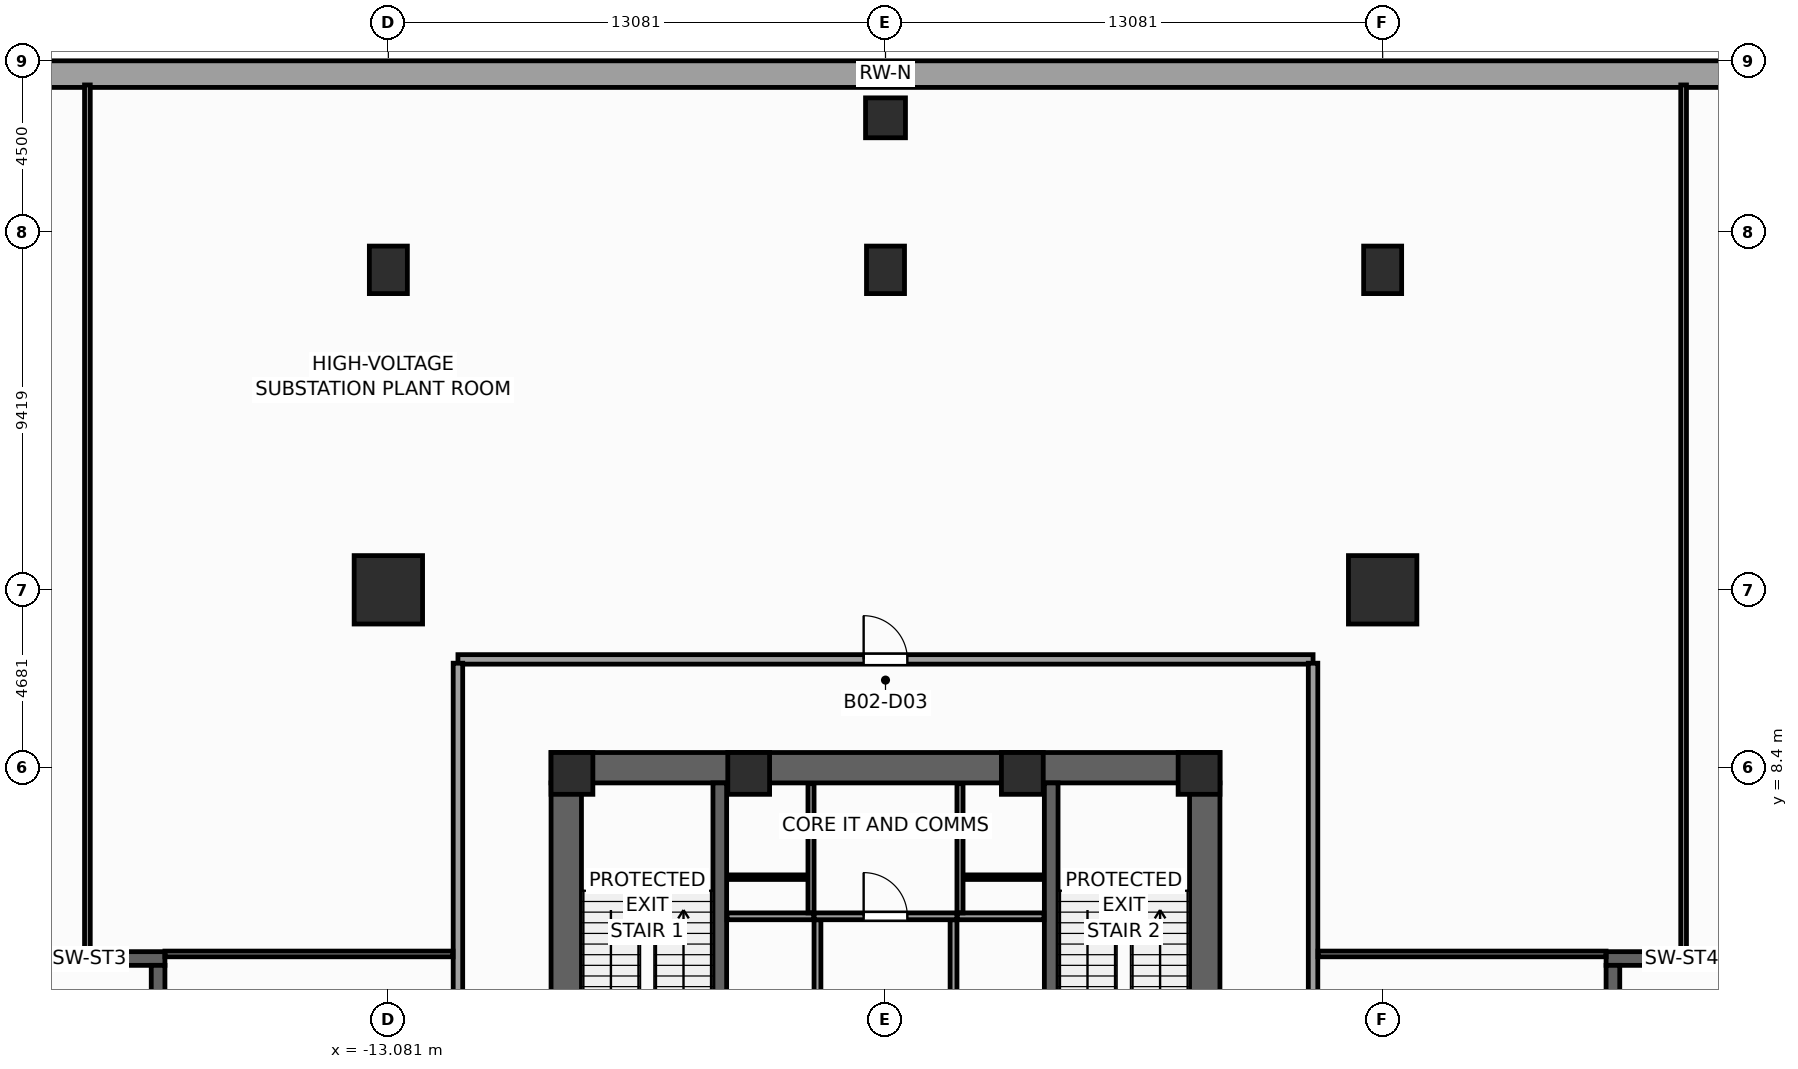
"""IFC4 building model, lengths in metres.
Left out: names, types, materials, properties, quantities, classifications, styles, units other than length and angle.
Written with IfcOpenShell. Run it as: python <this file> out.ifc"""

import sys

from ifc_helpers import new_model, si_unit, direction, frame, frame_2d, origin, origin_2d, place, context, subcontext, project, spatial, rectangle, extrude, source, transform, mapped, element, fill, save


model = new_model("IFC4")
c1 = context("Model", 3, precision=1e-05, world=origin(), true_north=direction((0.0, 1.0)))
c2 = subcontext(c1, "Body", "Model", "MODEL_VIEW")
j1 = project(units=[si_unit("LENGTHUNIT", "METRE"), si_unit("PLANEANGLEUNIT", "RADIAN")], contexts=[c1])
p1 = place(None, origin())
s1 = spatial("IfcSite", under=j1, at=p1, CompositionType="ELEMENT")
p2 = place(p1, origin())
s2 = spatial("IfcBuilding", under=s1, at=p2, CompositionType="ELEMENT")
p3 = place(p2, frame((0.0, 0.0, -9.0)))
s3 = spatial("IfcBuildingStorey", under=s2, at=p3, CompositionType="ELEMENT", Elevation=-9.0)
p4 = place(p3, frame((-8.8, 8.4, 0.0), z_axis=(0.0, 0.0, 1.0), x_axis=(1.0, 0.0, 0.0)))
e1 = element("IfcWall", 1, at=p4, inside=s3, PredefinedType="SHEAR", context=c2, shape_type="SweptSolid", body=[
    extrude(rectangle(XDim=17.6, YDim=0.8, at=frame_2d((8.8, 0.0))), origin(), (0.0, 0.0, 1.0), 4.5),
])
p5 = place(p3, frame((-8.4, -8.0, 0.0), z_axis=(0.0, 0.0, 1.0), x_axis=(0.0, 1.0, 0.0)))
e2 = element("IfcWall", 2, at=p5, inside=s3, PredefinedType="SHEAR", context=c2, shape_type="SweptSolid", body=[
    extrude(rectangle(XDim=16.0, YDim=0.8, at=frame_2d((8.0, 0.0))), origin(), (0.0, 0.0, 1.0), 4.5),
])
p6 = place(p5, frame((4.69, 0.0, 0.0)))
e3 = element("IfcOpeningElement", 3, at=p6, cuts=e2, PredefinedType="OPENING", context=c2, shape_type="SweptSolid", body=[
    extrude(rectangle(XDim=1.3, YDim=2.2, at=frame_2d((0.65, 1.1))), frame((0.0, 0.41, 0.0), z_axis=(0.0, -1.0, 0.0), x_axis=(1.0, 0.0, 0.0)), (0.0, 0.0, 1.0), 0.82),
])
p7 = place(p3, frame((8.4, -8.0, 0.0), z_axis=(0.0, 0.0, 1.0), x_axis=(0.0, 1.0, 0.0)))
e4 = element("IfcWall", 4, at=p7, inside=s3, PredefinedType="SHEAR", context=c2, shape_type="SweptSolid", body=[
    extrude(rectangle(XDim=16.0, YDim=0.8, at=frame_2d((8.0, 0.0))), origin(), (0.0, 0.0, 1.0), 4.5),
])
p8 = place(p7, frame((4.69, 0.0, 0.0)))
e5 = element("IfcOpeningElement", 5, at=p8, cuts=e4, PredefinedType="OPENING", context=c2, shape_type="SweptSolid", body=[
    extrude(rectangle(XDim=1.3, YDim=2.2, at=frame_2d((0.65, 1.1))), frame((0.0, 0.41, 0.0), z_axis=(0.0, -1.0, 0.0), x_axis=(1.0, 0.0, 0.0)), (0.0, 0.0, 1.0), 0.82),
])
for number, where, z_axis, x_axis in (
    (6, (-4.36, -8.0, 0.0), (0.0, 0.0, 1.0), (0.0, 1.0, 0.0)),
    (7, (4.36, -8.0, 0.0), (0.0, 0.0, 1.0), (0.0, 1.0, 0.0)),
):
    element("IfcWall", number, at=place(p3, frame(where, z_axis=z_axis, x_axis=x_axis)), inside=s3, PredefinedType="SHEAR", context=c2, shape_type="SweptSolid", body=[
        extrude(rectangle(XDim=16.0, YDim=0.36, at=frame_2d((8.0, 0.0))), origin(), (0.0, 0.0, 1.0), 4.5),
    ])
p9 = place(p3, frame((-22.94, 3.38, 0.0), z_axis=(0.0, 0.0, 1.0), x_axis=(1.0, 0.0, 0.0)))
e8 = element("IfcWall", 8, at=p9, inside=s3, PredefinedType="SHEAR", context=c2, shape_type="SweptSolid", body=[
    extrude(rectangle(XDim=3.98, YDim=0.36, at=frame_2d((1.99, 0.0))), origin(), (0.0, 0.0, 1.0), 4.5),
])
p10 = place(p3, frame((-19.14, -4.6, 0.0), z_axis=(0.0, 0.0, 1.0), x_axis=(0.0, 1.0, 0.0)))
e9 = element("IfcWall", 9, at=p10, inside=s3, PredefinedType="SHEAR", context=c2, shape_type="SweptSolid", body=[
    extrude(rectangle(XDim=7.8, YDim=0.36, at=frame_2d((3.9, 0.0))), origin(), (0.0, 0.0, 1.0), 4.5),
])
p11 = place(p3, frame((18.96, 3.38, 0.0), z_axis=(0.0, 0.0, 1.0), x_axis=(1.0, 0.0, 0.0)))
e10 = element("IfcWall", 10, at=p11, inside=s3, PredefinedType="SHEAR", context=c2, shape_type="SweptSolid", body=[
    extrude(rectangle(XDim=3.98, YDim=0.36, at=frame_2d((1.99, 0.0))), origin(), (0.0, 0.0, 1.0), 4.5),
])
p12 = place(p3, frame((19.14, -4.6, 0.0), z_axis=(0.0, 0.0, 1.0), x_axis=(0.0, 1.0, 0.0)))
e11 = element("IfcWall", 11, at=p12, inside=s3, PredefinedType="SHEAR", context=c2, shape_type="SweptSolid", body=[
    extrude(rectangle(XDim=7.8, YDim=0.36, at=frame_2d((3.9, 0.0))), origin(), (0.0, 0.0, 1.0), 4.5),
])
p13 = place(p3, frame((-42.0, 26.65, 0.0), z_axis=(0.0, 0.0, 1.0), x_axis=(1.0, 0.0, 0.0)))
e12 = element("IfcWall", 12, at=p13, inside=s3, PredefinedType="USERDEFINED", context=c2, shape_type="SweptSolid", body=[
    extrude(rectangle(XDim=84.0, YDim=0.7, at=frame_2d((42.0, 0.0))), origin(), (0.0, 0.0, 1.0), 4.5),
])
m1 = source(origin(), c2, "Body", "SweptSolid", [
    extrude(rectangle(XDim=1.1, YDim=1.1, at=origin_2d()), origin(), (0.0, 0.0, 1.0), 4.5),
])
for number, where, z_axis, x_axis in (
    (13, (8.25, 8.25, 0.0), (0.0, 0.0, 1.0), (1.0, 0.0, 0.0)),
    (14, (-8.25, 8.25, 0.0), (0.0, 0.0, 1.0), (1.0, 0.0, 0.0)),
    (15, (-3.6, 8.25, 0.0), (0.0, 0.0, 1.0), (1.0, 0.0, 0.0)),
    (16, (3.6, 8.25, 0.0), (0.0, 0.0, 1.0), (1.0, 0.0, 0.0)),
):
    element("IfcColumn", number, at=place(p3, frame(where, z_axis=z_axis, x_axis=x_axis)), inside=s3, PredefinedType="PILASTER", context=c2, shape_type="MappedRepresentation", body=[
        mapped(m1, transform((0.0, 0.0, 0.0), scale=1.0)),
    ])
m2 = source(origin(), c2, "Body", "SweptSolid", [
    extrude(rectangle(XDim=1.8, YDim=1.8, at=origin_2d()), origin(), (0.0, 0.0, 1.0), 4.5),
])
for number, where, z_axis, x_axis in (
    (17, (13.081, 13.081, 0.0), (0.0, 0.0, 1.0), (1.0, 0.0, 0.0)),
    (18, (-13.081, 13.081, 0.0), (0.0, 0.0, 1.0), (1.0, 0.0, 0.0)),
):
    element("IfcColumn", number, at=place(p3, frame(where, z_axis=z_axis, x_axis=x_axis)), inside=s3, PredefinedType="COLUMN", context=c2, shape_type="MappedRepresentation", body=[
        mapped(m2, transform((0.0, 0.0, 0.0), scale=1.0)),
    ])
m3 = source(origin(), c2, "Body", "SweptSolid", [
    extrude(rectangle(XDim=1.0, YDim=1.25, at=origin_2d()), origin(), (0.0, 0.0, 1.0), 4.5),
])
for number, where, z_axis, x_axis in (
    (19, (-13.081, 21.5, 0.0), (0.0, 0.0, 1.0), (1.0, 0.0, 0.0)),
    (20, (0.0, 21.5, 0.0), (0.0, 0.0, 1.0), (1.0, 0.0, 0.0)),
    (21, (13.081, 21.5, 0.0), (0.0, 0.0, 1.0), (1.0, 0.0, 0.0)),
):
    element("IfcColumn", number, at=place(p3, frame(where, z_axis=z_axis, x_axis=x_axis)), inside=s3, PredefinedType="COLUMN", context=c2, shape_type="MappedRepresentation", body=[
        mapped(m3, transform((0.0, 0.0, 0.0), scale=1.0)),
    ])
m4 = source(origin(), c2, "Body", "SweptSolid", [
    extrude(rectangle(XDim=1.05, YDim=1.05, at=origin_2d()), origin(), (0.0, 0.0, 1.0), 4.5),
])
p14 = place(p3, frame((0.0, 25.5, 0.0), z_axis=(0.0, 0.0, 1.0), x_axis=(1.0, 0.0, 0.0)))
e22 = element("IfcColumn", 22, at=p14, inside=s3, PredefinedType="COLUMN", context=c2, shape_type="MappedRepresentation", body=[
    mapped(m4, transform((0.0, 0.0, 0.0), scale=1.0)),
])
for number, where, z_axis, x_axis in (
    (23, (-1.79, -7.98, 0.0), (0.0, 0.0, 1.0), (0.0, 1.0, 0.0)),
    (24, (1.79, -7.98, 0.0), (0.0, 0.0, 1.0), (0.0, 1.0, 0.0)),
):
    element("IfcWall", number, at=place(p3, frame(where, z_axis=z_axis, x_axis=x_axis)), inside=s3, PredefinedType="PARTITIONING", context=c2, shape_type="SweptSolid", body=[
        extrude(rectangle(XDim=12.38, YDim=0.18, at=frame_2d((6.19, 0.0))), origin(), (0.0, 0.0, 1.0), 4.18),
    ])
p15 = place(p3, frame((-1.88, 4.49, 0.0), z_axis=(0.0, 0.0, 1.0), x_axis=(1.0, 0.0, 0.0)))
e25 = element("IfcWall", 25, at=p15, inside=s3, PredefinedType="PARTITIONING", context=c2, shape_type="SweptSolid", body=[
    extrude(rectangle(XDim=3.76, YDim=0.18, at=frame_2d((1.88, 0.0))), origin(), (0.0, 0.0, 1.0), 4.18),
])
p16 = place(p15, frame((1.305, 0.0, 0.0)))
e26 = element("IfcOpeningElement", 26, at=p16, cuts=e25, PredefinedType="OPENING", context=c2, shape_type="SweptSolid", body=[
    extrude(rectangle(XDim=1.15, YDim=2.25, at=frame_2d((0.575, 1.125))), frame((0.0, 0.1, 0.0), z_axis=(0.0, -1.0, 0.0), x_axis=(1.0, 0.0, 0.0)), (0.0, 0.0, 1.0), 0.2),
])
for number, where, z_axis, x_axis in (
    (27, (-4.17, 4.49, 0.0), (0.0, 0.0, 1.0), (1.0, 0.0, 0.0)),
    (28, (1.89, 4.49, 0.0), (0.0, 0.0, 1.0), (1.0, 0.0, 0.0)),
):
    element("IfcWall", number, at=place(p3, frame(where, z_axis=z_axis, x_axis=x_axis)), inside=s3, PredefinedType="PARTITIONING", context=c2, shape_type="SweptSolid", body=[
        extrude(rectangle(XDim=2.28, YDim=0.18, at=frame_2d((1.14, 0.0))), origin(), (0.0, 0.0, 1.0), 4.18),
    ])
for number, where, z_axis, x_axis in (
    (29, (-1.96, 4.58, 0.0), (0.0, 0.0, 1.0), (0.0, 1.0, 0.0)),
    (30, (1.96, 4.58, 0.0), (0.0, 0.0, 1.0), (0.0, 1.0, 0.0)),
):
    element("IfcWall", number, at=place(p3, frame(where, z_axis=z_axis, x_axis=x_axis)), inside=s3, PredefinedType="PARTITIONING", context=c2, shape_type="SweptSolid", body=[
        extrude(rectangle(XDim=3.4, YDim=0.16, at=frame_2d((1.7, 0.0))), origin(), (0.0, 0.0, 1.0), 4.18),
    ])
for number, where, z_axis, x_axis in (
    (31, (-4.16, 5.52, 0.0), (0.0, 0.0, 1.0), (1.0, 0.0, 0.0)),
    (32, (2.06, 5.52, 0.0), (0.0, 0.0, 1.0), (1.0, 0.0, 0.0)),
):
    element("IfcWall", number, at=place(p3, frame(where, z_axis=z_axis, x_axis=x_axis)), inside=s3, PredefinedType="PARTITIONING", context=c2, shape_type="SweptSolid", body=[
        extrude(rectangle(XDim=2.1, YDim=0.12, at=frame_2d((1.05, 0.0))), origin(), (0.0, 0.0, 1.0), 4.18),
    ])
p17 = place(p3, frame((-11.25, 11.25, 0.0), z_axis=(0.0, 0.0, 1.0), x_axis=(1.0, 0.0, 0.0)))
e33 = element("IfcWall", 33, at=p17, inside=s3, PredefinedType="PARTITIONING", context=c2, shape_type="SweptSolid", body=[
    extrude(rectangle(XDim=22.5, YDim=0.25, at=frame_2d((11.25, 0.0))), origin(), (0.0, 0.0, 1.0), 4.18),
])
p18 = place(p17, frame((10.675, 0.0, 0.0)))
e34 = element("IfcOpeningElement", 34, at=p18, cuts=e33, PredefinedType="OPENING", context=c2, shape_type="SweptSolid", body=[
    extrude(rectangle(XDim=1.15, YDim=2.25, at=frame_2d((0.575, 1.125))), frame((0.0, 0.135, 0.0), z_axis=(0.0, -1.0, 0.0), x_axis=(1.0, 0.0, 0.0)), (0.0, 0.0, 1.0), 0.27),
])
p19 = place(p3, frame((-11.25, -4.96, 0.0), z_axis=(0.0, 0.0, 1.0), x_axis=(0.0, 1.0, 0.0)))
e35 = element("IfcWall", 35, at=p19, inside=s3, PredefinedType="PARTITIONING", context=c2, shape_type="SweptSolid", body=[
    extrude(rectangle(XDim=16.11, YDim=0.25, at=frame_2d((8.055, 0.0))), origin(), (0.0, 0.0, 1.0), 4.18),
])
p20 = place(p19, frame((3.82, 0.0, 0.0)))
e36 = element("IfcOpeningElement", 36, at=p20, cuts=e35, PredefinedType="OPENING", context=c2, shape_type="SweptSolid", body=[
    extrude(rectangle(XDim=1.15, YDim=2.25, at=frame_2d((0.575, 1.125))), frame((0.0, 0.135, 0.0), z_axis=(0.0, -1.0, 0.0), x_axis=(1.0, 0.0, 0.0)), (0.0, 0.0, 1.0), 0.27),
])
p21 = place(p3, frame((11.25, -4.96, 0.0), z_axis=(0.0, 0.0, 1.0), x_axis=(0.0, 1.0, 0.0)))
e37 = element("IfcWall", 37, at=p21, inside=s3, PredefinedType="PARTITIONING", context=c2, shape_type="SweptSolid", body=[
    extrude(rectangle(XDim=16.11, YDim=0.25, at=frame_2d((8.055, 0.0))), origin(), (0.0, 0.0, 1.0), 4.18),
])
p22 = place(p21, frame((3.82, 0.0, 0.0)))
e38 = element("IfcOpeningElement", 38, at=p22, cuts=e37, PredefinedType="OPENING", context=c2, shape_type="SweptSolid", body=[
    extrude(rectangle(XDim=1.15, YDim=2.25, at=frame_2d((0.575, 1.125))), frame((0.0, 0.135, 0.0), z_axis=(0.0, -1.0, 0.0), x_axis=(1.0, 0.0, 0.0)), (0.0, 0.0, 1.0), 0.27),
])
for number, where, z_axis, x_axis in (
    (39, (-21.0, 3.56, 0.0), (0.0, 0.0, 1.0), (0.0, 1.0, 0.0)),
    (40, (21.0, 3.56, 0.0), (0.0, 0.0, 1.0), (0.0, 1.0, 0.0)),
):
    element("IfcWall", number, at=place(p3, frame(where, z_axis=z_axis, x_axis=x_axis)), inside=s3, PredefinedType="PARTITIONING", context=c2, shape_type="SweptSolid", body=[
        extrude(rectangle(XDim=22.805, YDim=0.15, at=frame_2d((11.402, 0.0))), origin(), (0.0, 0.0, 1.0), 4.18),
    ])
for number, where, z_axis, x_axis in (
    (41, (-18.96, 3.5, 0.0), (0.0, 0.0, 1.0), (1.0, 0.0, 0.0)),
    (42, (11.38, 3.5, 0.0), (0.0, 0.0, 1.0), (1.0, 0.0, 0.0)),
):
    element("IfcWall", number, at=place(p3, frame(where, z_axis=z_axis, x_axis=x_axis)), inside=s3, PredefinedType="PARTITIONING", context=c2, shape_type="SweptSolid", body=[
        extrude(rectangle(XDim=7.58, YDim=0.15, at=frame_2d((3.79, 0.0))), origin(), (0.0, 0.0, 1.0), 4.18),
    ])
m5 = source(origin(), c2, "Body", "SweptSolid", [
    extrude(rectangle(XDim=1.15, YDim=2.25, at=frame_2d((0.575, 1.125))), frame((0.0, 0.025, 0.0), z_axis=(0.0, -1.0, 0.0), x_axis=(1.0, 0.0, 0.0)), (0.0, 0.0, 1.0), 0.05),
])
p23 = place(p16, origin())
e43 = element("IfcDoor", 43, at=p23, inside=s3, OperationType="SINGLE_SWING_LEFT", PredefinedType="DOOR", context=c2, shape_type="MappedRepresentation", body=[
    mapped(m5, transform((0.0, 0.0, 0.0), scale=1.0)),
])
fill(e26, e43)
p24 = place(p18, origin())
e44 = element("IfcDoor", 44, at=p24, inside=s3, OperationType="SINGLE_SWING_LEFT", PredefinedType="DOOR", context=c2, shape_type="MappedRepresentation", body=[
    mapped(m5, transform((0.0, 0.0, 0.0), scale=1.0)),
])
fill(e34, e44)
save(model, sys.argv[1])
